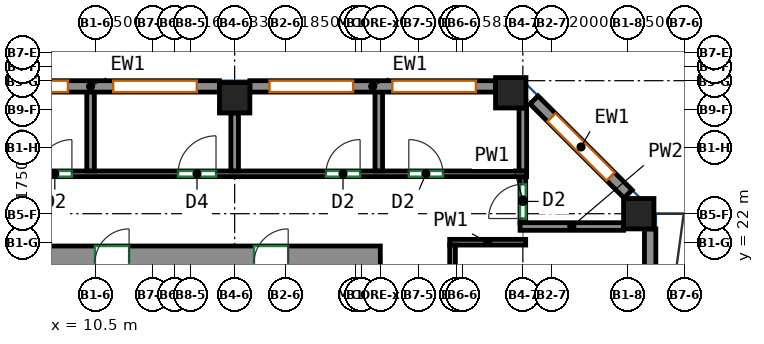
"""IFC4 building model, lengths in metres.
Left out: names, types, materials, properties, quantities, classifications, styles, units other than length and angle.
Written with IfcOpenShell. Run it as: python <this file> out.ifc"""

import sys

from ifc_helpers import new_model, si_unit, direction, frame, frame_2d, origin, origin_2d, place, context, subcontext, project, spatial, rectangle, extrude, source, transform, mapped, element, fill, save


model = new_model("IFC4")
c1 = context("Model", 3, precision=1e-05, world=origin(), true_north=direction((0.0, 1.0)))
c2 = subcontext(c1, "Body", "Model", "MODEL_VIEW")
j1 = project(units=[si_unit("LENGTHUNIT", "METRE"), si_unit("PLANEANGLEUNIT", "RADIAN")], contexts=[c1])
p1 = place(None, origin())
s1 = spatial("IfcSite", under=j1, at=p1, CompositionType="ELEMENT")
p2 = place(p1, origin())
s2 = spatial("IfcBuilding", under=s1, at=p2, CompositionType="ELEMENT")
p3 = place(p2, frame((0.0, 0.0, 175.3)))
s3 = spatial("IfcBuildingStorey", under=s2, at=p3, CompositionType="ELEMENT", Elevation=175.3)
m1 = source(origin(), c2, "Body", "SweptSolid", [
    extrude(rectangle(XDim=0.8, YDim=0.8, at=origin_2d()), origin(), (0.0, 0.0, 1.0), 3.12),
])
for number, where, z_axis, x_axis in (
    (1, (14.167, 25.8, 0.0), (0.0, 0.0, 1.0), (1.0, 0.0, 0.0)),
    (2, (21.432, 25.932, 0.0), (0.0, 0.0, 1.0), (1.0, 0.0, 0.0)),
    (3, (24.8, 22.75, 0.0), (0.0, 0.0, 1.0), (1.0, 0.0, 0.0)),
):
    element("IfcColumn", number, at=place(p3, frame(where, z_axis=z_axis, x_axis=x_axis)), inside=s3, PredefinedType="COLUMN", context=c2, shape_type="MappedRepresentation", body=[
        mapped(m1, transform((0.0, 0.0, 0.0))),
    ])
m2 = source(origin(), c2, "Body", "SweptSolid", [
    extrude(rectangle(XDim=33.9, YDim=0.9, at=frame_2d((16.95, 0.0))), origin(), (0.0, 0.0, 1.0), 3.12),
])
p4 = place(p3, frame((-15.9, 21.45, 0.0), z_axis=(0.0, 0.0, 1.0), x_axis=(1.0, 0.0, 0.0)))
e4 = element("IfcWall", 4, at=p4, inside=s3, PredefinedType="SHEAR", context=c2, shape_type="MappedRepresentation", body=[
    mapped(m2, transform((0.0, 0.0, 0.0))),
])
p5 = place(p4, frame((6.008, 0.0, 0.0)))
e5 = element("IfcOpeningElement", 5, at=p5, cuts=e4, PredefinedType="OPENING", context=c2, shape_type="SweptSolid", body=[
    extrude(rectangle(XDim=0.9, YDim=2.1, at=frame_2d((0.45, 1.05))), frame((0.0, 0.46, 0.0), z_axis=(0.0, -1.0, 0.0), x_axis=(1.0, 0.0, 0.0)), (0.0, 0.0, 1.0), 0.92),
])
p6 = place(p4, frame((11.073, 0.0, 0.0)))
e6 = element("IfcOpeningElement", 6, at=p6, cuts=e4, PredefinedType="OPENING", context=c2, shape_type="SweptSolid", body=[
    extrude(rectangle(XDim=0.9, YDim=2.1, at=frame_2d((0.45, 1.05))), frame((0.0, 0.46, 0.0), z_axis=(0.0, -1.0, 0.0), x_axis=(1.0, 0.0, 0.0)), (0.0, 0.0, 1.0), 0.92),
])
p7 = place(p4, frame((16.205, 0.0, 0.0)))
e7 = element("IfcOpeningElement", 7, at=p7, cuts=e4, PredefinedType="OPENING", context=c2, shape_type="SweptSolid", body=[
    extrude(rectangle(XDim=0.9, YDim=2.1, at=frame_2d((0.45, 1.05))), frame((0.0, 0.46, 0.0), z_axis=(0.0, -1.0, 0.0), x_axis=(1.0, 0.0, 0.0)), (0.0, 0.0, 1.0), 0.92),
])
p8 = place(p4, frame((21.029, 0.0, 0.0)))
e8 = element("IfcOpeningElement", 8, at=p8, cuts=e4, PredefinedType="OPENING", context=c2, shape_type="SweptSolid", body=[
    extrude(rectangle(XDim=0.9, YDim=2.1, at=frame_2d((0.45, 1.05))), frame((0.0, 0.46, 0.0), z_axis=(0.0, -1.0, 0.0), x_axis=(1.0, 0.0, 0.0)), (0.0, 0.0, 1.0), 0.92),
])
p9 = place(p4, frame((26.389, 0.0, 0.0)))
e9 = element("IfcOpeningElement", 9, at=p9, cuts=e4, PredefinedType="OPENING", context=c2, shape_type="SweptSolid", body=[
    extrude(rectangle(XDim=0.9, YDim=2.1, at=frame_2d((0.45, 1.05))), frame((0.0, 0.46, 0.0), z_axis=(0.0, -1.0, 0.0), x_axis=(1.0, 0.0, 0.0)), (0.0, 0.0, 1.0), 0.92),
])
p10 = place(p4, frame((2.425, 0.0, 0.0)))
e10 = element("IfcOpeningElement", 10, at=p10, cuts=e4, PredefinedType="OPENING", context=c2, shape_type="SweptSolid", body=[
    extrude(rectangle(XDim=0.9, YDim=2.1, at=frame_2d((0.45, 1.05))), frame((0.0, 0.46, 0.0), z_axis=(0.0, -1.0, 0.0), x_axis=(1.0, 0.0, 0.0)), (0.0, 0.0, 1.0), 0.92),
])
p11 = place(p4, frame((30.575, 0.0, 0.0)))
e11 = element("IfcOpeningElement", 11, at=p11, cuts=e4, PredefinedType="OPENING", context=c2, shape_type="SweptSolid", body=[
    extrude(rectangle(XDim=0.9, YDim=2.1, at=frame_2d((0.45, 1.05))), frame((0.0, 0.46, 0.0), z_axis=(0.0, -1.0, 0.0), x_axis=(1.0, 0.0, 0.0)), (0.0, 0.0, 1.0), 0.92),
])
m3 = source(origin(), c2, "Body", "SweptSolid", [
    extrude(rectangle(XDim=13.95, YDim=0.3, at=frame_2d((6.975, 0.0))), origin(), (0.0, 0.0, 1.0), 3.12),
])
p12 = place(p3, frame((25.1, 8.4, 0.0), z_axis=(0.0, 0.0, 1.0), x_axis=(0.0, 1.0, 0.0)))
e12 = element("IfcWall", 12, at=p12, inside=s3, PredefinedType="SOLIDWALL", context=c2, shape_type="MappedRepresentation", body=[
    mapped(m3, transform((0.0, 0.0, 0.0))),
])
p13 = place(p12, frame((0.994, 0.0, 0.85)))
e13 = element("IfcOpeningElement", 13, at=p13, cuts=e12, PredefinedType="OPENING", context=c2, shape_type="SweptSolid", body=[
    extrude(rectangle(XDim=1.5, YDim=1.95, at=frame_2d((0.75, 0.975))), frame((0.0, 0.16, 0.0), z_axis=(0.0, -1.0, 0.0), x_axis=(1.0, 0.0, 0.0)), (0.0, 0.0, 1.0), 0.32),
])
p14 = place(p12, frame((4.481, 0.0, 0.85)))
e14 = element("IfcOpeningElement", 14, at=p14, cuts=e12, PredefinedType="OPENING", context=c2, shape_type="SweptSolid", body=[
    extrude(rectangle(XDim=1.5, YDim=1.95, at=frame_2d((0.75, 0.975))), frame((0.0, 0.16, 0.0), z_axis=(0.0, -1.0, 0.0), x_axis=(1.0, 0.0, 0.0)), (0.0, 0.0, 1.0), 0.32),
])
p15 = place(p12, frame((7.969, 0.0, 0.85)))
e15 = element("IfcOpeningElement", 15, at=p15, cuts=e12, PredefinedType="OPENING", context=c2, shape_type="SweptSolid", body=[
    extrude(rectangle(XDim=1.5, YDim=1.95, at=frame_2d((0.75, 0.975))), frame((0.0, 0.16, 0.0), z_axis=(0.0, -1.0, 0.0), x_axis=(1.0, 0.0, 0.0)), (0.0, 0.0, 1.0), 0.32),
])
p16 = place(p12, frame((11.456, 0.0, 0.85)))
e16 = element("IfcOpeningElement", 16, at=p16, cuts=e12, PredefinedType="OPENING", context=c2, shape_type="SweptSolid", body=[
    extrude(rectangle(XDim=1.5, YDim=1.95, at=frame_2d((0.75, 0.975))), frame((0.0, 0.16, 0.0), z_axis=(0.0, -1.0, 0.0), x_axis=(1.0, 0.0, 0.0)), (0.0, 0.0, 1.0), 0.32),
])
m4 = source(origin(), c2, "Body", "SweptSolid", [
    extrude(rectangle(XDim=3.5, YDim=0.3, at=frame_2d((1.75, 0.0))), origin(), (0.0, 0.0, 1.0), 3.12),
])
p17 = place(p3, frame((24.519, 23.269, 0.0), z_axis=(0.0, 0.0, 1.0), x_axis=(-0.70707190453, 0.707141656123, 0.0)))
e17 = element("IfcWall", 17, at=p17, inside=s3, PredefinedType="SOLIDWALL", context=c2, shape_type="MappedRepresentation", body=[
    mapped(m4, transform((0.0, 0.0, 0.0))),
])
p18 = place(p17, frame((0.65, 0.0, 0.85)))
e18 = element("IfcOpeningElement", 18, at=p18, cuts=e17, PredefinedType="OPENING", context=c2, shape_type="SweptSolid", body=[
    extrude(rectangle(XDim=2.2, YDim=1.95, at=frame_2d((1.1, 0.975))), frame((0.0, 0.16, 0.0), z_axis=(0.0, -1.0, 0.0), x_axis=(1.0, 0.0, 0.0)), (0.0, 0.0, 1.0), 0.32),
])
m5 = source(origin(), c2, "Body", "SweptSolid", [
    extrude(rectangle(XDim=6.465, YDim=0.3, at=frame_2d((3.232, 0.0))), origin(), (0.0, 0.0, 1.0), 3.12),
])
p19 = place(p3, frame((21.032, 26.1, 0.0), z_axis=(0.0, 0.0, 1.0), x_axis=(-1.0, 0.0, 0.0)))
e19 = element("IfcWall", 19, at=p19, inside=s3, PredefinedType="SOLIDWALL", context=c2, shape_type="MappedRepresentation", body=[
    mapped(m5, transform((0.0, 0.0, 0.0))),
])
p20 = place(p19, frame((0.516, 0.0, 0.85)))
e20 = element("IfcOpeningElement", 20, at=p20, cuts=e19, PredefinedType="OPENING", context=c2, shape_type="SweptSolid", body=[
    extrude(rectangle(XDim=2.2, YDim=1.95, at=frame_2d((1.1, 0.975))), frame((0.0, 0.16, 0.0), z_axis=(0.0, -1.0, 0.0), x_axis=(1.0, 0.0, 0.0)), (0.0, 0.0, 1.0), 0.32),
])
p21 = place(p19, frame((3.749, 0.0, 0.85)))
e21 = element("IfcOpeningElement", 21, at=p21, cuts=e19, PredefinedType="OPENING", context=c2, shape_type="SweptSolid", body=[
    extrude(rectangle(XDim=2.2, YDim=1.95, at=frame_2d((1.1, 0.975))), frame((0.0, 0.16, 0.0), z_axis=(0.0, -1.0, 0.0), x_axis=(1.0, 0.0, 0.0)), (0.0, 0.0, 1.0), 0.32),
])
m6 = source(origin(), c2, "Body", "SweptSolid", [
    extrude(rectangle(XDim=6.783, YDim=0.3, at=frame_2d((3.392, 0.0))), origin(), (0.0, 0.0, 1.0), 3.12),
])
p22 = place(p3, frame((13.767, 26.1, 0.0), z_axis=(0.0, 0.0, 1.0), x_axis=(-1.0, 0.0, 0.0)))
e22 = element("IfcWall", 22, at=p22, inside=s3, PredefinedType="SOLIDWALL", context=c2, shape_type="MappedRepresentation", body=[
    mapped(m6, transform((0.0, 0.0, 0.0))),
])
p23 = place(p22, frame((0.596, 0.0, 0.85)))
e23 = element("IfcOpeningElement", 23, at=p23, cuts=e22, PredefinedType="OPENING", context=c2, shape_type="SweptSolid", body=[
    extrude(rectangle(XDim=2.2, YDim=1.95, at=frame_2d((1.1, 0.975))), frame((0.0, 0.16, 0.0), z_axis=(0.0, -1.0, 0.0), x_axis=(1.0, 0.0, 0.0)), (0.0, 0.0, 1.0), 0.32),
])
p24 = place(p22, frame((3.988, 0.0, 0.85)))
e24 = element("IfcOpeningElement", 24, at=p24, cuts=e22, PredefinedType="OPENING", context=c2, shape_type="SweptSolid", body=[
    extrude(rectangle(XDim=2.2, YDim=1.95, at=frame_2d((1.1, 0.975))), frame((0.0, 0.16, 0.0), z_axis=(0.0, -1.0, 0.0), x_axis=(1.0, 0.0, 0.0)), (0.0, 0.0, 1.0), 0.32),
])
p25 = place(p3, frame((19.825, 22.0, 0.0), z_axis=(0.0, 0.0, 1.0), x_axis=(1.0, 0.0, 0.0)))
e25 = element("IfcWall", 25, at=p25, inside=s3, PredefinedType="PARTITIONING", context=c2, shape_type="SweptSolid", body=[
    extrude(rectangle(XDim=2.0, YDim=0.15, at=frame_2d((1.0, 0.0))), origin(), (0.0, 0.0, 1.0), 3.12),
])
p26 = place(p3, frame((19.9, 17.75, 0.0), z_axis=(0.0, 0.0, 1.0), x_axis=(0.0, 1.0, 0.0)))
e26 = element("IfcWall", 26, at=p26, inside=s3, PredefinedType="PARTITIONING", context=c2, shape_type="SweptSolid", body=[
    extrude(rectangle(XDim=4.175, YDim=0.15, at=frame_2d((2.087, 0.0))), origin(), (0.0, 0.0, 1.0), 3.12),
])
p27 = place(p26, frame((1.432, 0.0, 0.0)))
e27 = element("IfcOpeningElement", 27, at=p27, cuts=e26, PredefinedType="OPENING", context=c2, shape_type="SweptSolid", body=[
    extrude(rectangle(XDim=0.9, YDim=2.1, at=frame_2d((0.45, 1.05))), frame((0.0, 0.085, 0.0), z_axis=(0.0, -1.0, 0.0), x_axis=(1.0, 0.0, 0.0)), (0.0, 0.0, 1.0), 0.17),
])
p28 = place(p3, frame((21.75, 22.503, 0.0), z_axis=(0.0, 0.0, 1.0), x_axis=(0.0, 1.0, 0.0)))
e28 = element("IfcWall", 28, at=p28, inside=s3, PredefinedType="PARTITIONING", context=c2, shape_type="SweptSolid", body=[
    extrude(rectangle(XDim=1.222, YDim=0.15, at=frame_2d((0.611, 0.0))), origin(), (0.0, 0.0, 1.0), 3.12),
])
p29 = place(p28, frame((0.12, 0.0, 0.0)))
e29 = element("IfcOpeningElement", 29, at=p29, cuts=e28, PredefinedType="OPENING", context=c2, shape_type="SweptSolid", body=[
    extrude(rectangle(XDim=0.9, YDim=2.1, at=frame_2d((0.45, 1.05))), frame((0.0, 0.085, 0.0), z_axis=(0.0, -1.0, 0.0), x_axis=(1.0, 0.0, 0.0)), (0.0, 0.0, 1.0), 0.17),
])
p30 = place(p3, frame((-20.059, 23.8, 0.0), z_axis=(0.0, 0.0, 1.0), x_axis=(1.0, 0.0, 0.0)))
e30 = element("IfcWall", 30, at=p30, inside=s3, PredefinedType="PARTITIONING", context=c2, shape_type="SweptSolid", body=[
    extrude(rectangle(XDim=41.909, YDim=0.15, at=frame_2d((20.955, 0.0))), origin(), (0.0, 0.0, 1.0), 3.12),
])
p31 = place(p30, frame((2.101, 0.0, 0.0)))
e31 = element("IfcOpeningElement", 31, at=p31, cuts=e30, PredefinedType="OPENING", context=c2, shape_type="SweptSolid", body=[
    extrude(rectangle(XDim=0.9, YDim=2.1, at=frame_2d((0.45, 1.05))), frame((0.0, 0.085, 0.0), z_axis=(0.0, -1.0, 0.0), x_axis=(1.0, 0.0, 0.0)), (0.0, 0.0, 1.0), 0.17),
])
p32 = place(p30, frame((4.585, 0.0, 0.0)))
e32 = element("IfcOpeningElement", 32, at=p32, cuts=e30, PredefinedType="OPENING", context=c2, shape_type="SweptSolid", body=[
    extrude(rectangle(XDim=1.0, YDim=2.1, at=frame_2d((0.5, 1.05))), frame((0.0, 0.085, 0.0), z_axis=(0.0, -1.0, 0.0), x_axis=(1.0, 0.0, 0.0)), (0.0, 0.0, 1.0), 0.17),
])
p33 = place(p30, frame((8.175, 0.0, 0.0)))
e33 = element("IfcOpeningElement", 33, at=p33, cuts=e30, PredefinedType="OPENING", context=c2, shape_type="SweptSolid", body=[
    extrude(rectangle(XDim=0.9, YDim=2.1, at=frame_2d((0.45, 1.05))), frame((0.0, 0.085, 0.0), z_axis=(0.0, -1.0, 0.0), x_axis=(1.0, 0.0, 0.0)), (0.0, 0.0, 1.0), 0.17),
])
p34 = place(p30, frame((13.173, 0.0, 0.0)))
e34 = element("IfcOpeningElement", 34, at=p34, cuts=e30, PredefinedType="OPENING", context=c2, shape_type="SweptSolid", body=[
    extrude(rectangle(XDim=1.0, YDim=2.1, at=frame_2d((0.5, 1.05))), frame((0.0, 0.085, 0.0), z_axis=(0.0, -1.0, 0.0), x_axis=(1.0, 0.0, 0.0)), (0.0, 0.0, 1.0), 0.17),
])
p35 = place(p30, frame((15.658, 0.0, 0.0)))
e35 = element("IfcOpeningElement", 35, at=p35, cuts=e30, PredefinedType="OPENING", context=c2, shape_type="SweptSolid", body=[
    extrude(rectangle(XDim=0.9, YDim=2.1, at=frame_2d((0.45, 1.05))), frame((0.0, 0.085, 0.0), z_axis=(0.0, -1.0, 0.0), x_axis=(1.0, 0.0, 0.0)), (0.0, 0.0, 1.0), 0.17),
])
p36 = place(p30, frame((21.315, 0.0, 0.0)))
e36 = element("IfcOpeningElement", 36, at=p36, cuts=e30, PredefinedType="OPENING", context=c2, shape_type="SweptSolid", body=[
    extrude(rectangle(XDim=0.9, YDim=2.1, at=frame_2d((0.45, 1.05))), frame((0.0, 0.085, 0.0), z_axis=(0.0, -1.0, 0.0), x_axis=(1.0, 0.0, 0.0)), (0.0, 0.0, 1.0), 0.17),
])
p37 = place(p30, frame((24.625, 0.0, 0.0)))
e37 = element("IfcOpeningElement", 37, at=p37, cuts=e30, PredefinedType="OPENING", context=c2, shape_type="SweptSolid", body=[
    extrude(rectangle(XDim=1.0, YDim=2.1, at=frame_2d((0.5, 1.05))), frame((0.0, 0.085, 0.0), z_axis=(0.0, -1.0, 0.0), x_axis=(1.0, 0.0, 0.0)), (0.0, 0.0, 1.0), 0.17),
])
p38 = place(p30, frame((29.043, 0.0, 0.0)))
e38 = element("IfcOpeningElement", 38, at=p38, cuts=e30, PredefinedType="OPENING", context=c2, shape_type="SweptSolid", body=[
    extrude(rectangle(XDim=0.9, YDim=2.1, at=frame_2d((0.45, 1.05))), frame((0.0, 0.085, 0.0), z_axis=(0.0, -1.0, 0.0), x_axis=(1.0, 0.0, 0.0)), (0.0, 0.0, 1.0), 0.17),
])
p39 = place(p30, frame((32.735, 0.0, 0.0)))
e39 = element("IfcOpeningElement", 39, at=p39, cuts=e30, PredefinedType="OPENING", context=c2, shape_type="SweptSolid", body=[
    extrude(rectangle(XDim=1.0, YDim=2.1, at=frame_2d((0.5, 1.05))), frame((0.0, 0.085, 0.0), z_axis=(0.0, -1.0, 0.0), x_axis=(1.0, 0.0, 0.0)), (0.0, 0.0, 1.0), 0.17),
])
p40 = place(p30, frame((36.627, 0.0, 0.0)))
e40 = element("IfcOpeningElement", 40, at=p40, cuts=e30, PredefinedType="OPENING", context=c2, shape_type="SweptSolid", body=[
    extrude(rectangle(XDim=0.9, YDim=2.1, at=frame_2d((0.45, 1.05))), frame((0.0, 0.085, 0.0), z_axis=(0.0, -1.0, 0.0), x_axis=(1.0, 0.0, 0.0)), (0.0, 0.0, 1.0), 0.17),
])
p41 = place(p30, frame((38.808, 0.0, 0.0)))
e41 = element("IfcOpeningElement", 41, at=p41, cuts=e30, PredefinedType="OPENING", context=c2, shape_type="SweptSolid", body=[
    extrude(rectangle(XDim=0.9, YDim=2.1, at=frame_2d((0.45, 1.05))), frame((0.0, 0.085, 0.0), z_axis=(0.0, -1.0, 0.0), x_axis=(1.0, 0.0, 0.0)), (0.0, 0.0, 1.0), 0.17),
])
p42 = place(p3, frame((24.4, 22.413, 0.0), z_axis=(0.0, 0.0, 1.0), x_axis=(-1.0, 0.0, 0.0)))
e42 = element("IfcWall", 42, at=p42, inside=s3, PredefinedType="PARTITIONING", context=c2, shape_type="SweptSolid", body=[
    extrude(rectangle(XDim=2.723, YDim=0.2, at=frame_2d((1.361, 0.0))), origin(), (0.0, 0.0, 1.0), 2.52),
])
p43 = place(p3, frame((21.75, 25.532, 0.0), z_axis=(0.0, 0.0, 1.0), x_axis=(0.0, -1.0, 0.0)))
e43 = element("IfcWall", 43, at=p43, inside=s3, PredefinedType="PARTITIONING", context=c2, shape_type="SweptSolid", body=[
    extrude(rectangle(XDim=1.655, YDim=0.2, at=frame_2d((0.828, 0.0))), origin(), (0.0, 0.0, 1.0), 3.12),
])
p44 = place(p3, frame((10.375, 23.877, 0.0), z_axis=(0.0, 0.0, 1.0), x_axis=(0.0, 1.0, 0.0)))
e44 = element("IfcWall", 44, at=p44, inside=s3, PredefinedType="PARTITIONING", context=c2, shape_type="SweptSolid", body=[
    extrude(rectangle(XDim=2.123, YDim=0.2, at=frame_2d((1.062, 0.0))), origin(), (0.0, 0.0, 1.0), 3.12),
])
p45 = place(p3, frame((14.167, 23.877, 0.0), z_axis=(0.0, 0.0, 1.0), x_axis=(0.0, 1.0, 0.0)))
e45 = element("IfcWall", 45, at=p45, inside=s3, PredefinedType="PARTITIONING", context=c2, shape_type="SweptSolid", body=[
    extrude(rectangle(XDim=1.523, YDim=0.2, at=frame_2d((0.761, 0.0))), origin(), (0.0, 0.0, 1.0), 3.12),
])
p46 = place(p3, frame((17.959, 23.877, 0.0), z_axis=(0.0, 0.0, 1.0), x_axis=(0.0, 1.0, 0.0)))
e46 = element("IfcWall", 46, at=p46, inside=s3, PredefinedType="PARTITIONING", context=c2, shape_type="SweptSolid", body=[
    extrude(rectangle(XDim=2.123, YDim=0.2, at=frame_2d((1.062, 0.0))), origin(), (0.0, 0.0, 1.0), 3.12),
])
p47 = place(p18, origin())
e47 = element("IfcWindow", 47, at=p47, inside=s3, PartitioningType="SINGLE_PANEL", PredefinedType="WINDOW", context=c2, shape_type="SweptSolid", body=[
    extrude(rectangle(XDim=2.2, YDim=1.95, at=frame_2d((1.1, 0.975))), frame((0.0, 0.03, 0.0), z_axis=(0.0, -1.0, 0.0), x_axis=(1.0, 0.0, 0.0)), (0.0, 0.0, 1.0), 0.06),
])
fill(e18, e47)
p48 = place(p20, origin())
e48 = element("IfcWindow", 48, at=p48, inside=s3, PartitioningType="SINGLE_PANEL", PredefinedType="WINDOW", context=c2, shape_type="SweptSolid", body=[
    extrude(rectangle(XDim=2.2, YDim=1.95, at=frame_2d((1.1, 0.975))), frame((0.0, 0.03, 0.0), z_axis=(0.0, -1.0, 0.0), x_axis=(1.0, 0.0, 0.0)), (0.0, 0.0, 1.0), 0.06),
])
fill(e20, e48)
p49 = place(p21, origin())
e49 = element("IfcWindow", 49, at=p49, inside=s3, PartitioningType="SINGLE_PANEL", PredefinedType="WINDOW", context=c2, shape_type="SweptSolid", body=[
    extrude(rectangle(XDim=2.2, YDim=1.95, at=frame_2d((1.1, 0.975))), frame((0.0, 0.03, 0.0), z_axis=(0.0, -1.0, 0.0), x_axis=(1.0, 0.0, 0.0)), (0.0, 0.0, 1.0), 0.06),
])
fill(e21, e49)
p50 = place(p23, origin())
e50 = element("IfcWindow", 50, at=p50, inside=s3, PartitioningType="SINGLE_PANEL", PredefinedType="WINDOW", context=c2, shape_type="SweptSolid", body=[
    extrude(rectangle(XDim=2.2, YDim=1.95, at=frame_2d((1.1, 0.975))), frame((0.0, 0.03, 0.0), z_axis=(0.0, -1.0, 0.0), x_axis=(1.0, 0.0, 0.0)), (0.0, 0.0, 1.0), 0.06),
])
fill(e23, e50)
p51 = place(p24, origin())
e51 = element("IfcWindow", 51, at=p51, inside=s3, PartitioningType="SINGLE_PANEL", PredefinedType="WINDOW", context=c2, shape_type="SweptSolid", body=[
    extrude(rectangle(XDim=2.2, YDim=1.95, at=frame_2d((1.1, 0.975))), frame((0.0, 0.03, 0.0), z_axis=(0.0, -1.0, 0.0), x_axis=(1.0, 0.0, 0.0)), (0.0, 0.0, 1.0), 0.06),
])
fill(e24, e51)
p52 = place(p29, origin())
e52 = element("IfcDoor", 52, at=p52, inside=s3, OperationType="SINGLE_SWING_LEFT", PredefinedType="DOOR", context=c2, shape_type="SweptSolid", body=[
    extrude(rectangle(XDim=0.9, YDim=2.1, at=frame_2d((0.45, 1.05))), frame((0.0, 0.025, 0.0), z_axis=(0.0, -1.0, 0.0), x_axis=(1.0, 0.0, 0.0)), (0.0, 0.0, 1.0), 0.05),
])
fill(e29, e52)
p53 = place(p38, origin())
e53 = element("IfcDoor", 53, at=p53, inside=s3, OperationType="SINGLE_SWING_RIGHT", PredefinedType="DOOR", context=c2, shape_type="SweptSolid", body=[
    extrude(rectangle(XDim=0.9, YDim=2.1, at=frame_2d((0.45, 1.05))), frame((0.0, 0.025, 0.0), z_axis=(0.0, -1.0, 0.0), x_axis=(1.0, 0.0, 0.0)), (0.0, 0.0, 1.0), 0.05),
])
fill(e38, e53)
p54 = place(p39, origin())
e54 = element("IfcDoor", 54, at=p54, inside=s3, OperationType="SINGLE_SWING_RIGHT", PredefinedType="DOOR", context=c2, shape_type="SweptSolid", body=[
    extrude(rectangle(XDim=1.0, YDim=2.1, at=frame_2d((0.5, 1.05))), frame((0.0, 0.025, 0.0), z_axis=(0.0, -1.0, 0.0), x_axis=(1.0, 0.0, 0.0)), (0.0, 0.0, 1.0), 0.05),
])
fill(e39, e54)
p55 = place(p40, origin())
e55 = element("IfcDoor", 55, at=p55, inside=s3, OperationType="SINGLE_SWING_RIGHT", PredefinedType="DOOR", context=c2, shape_type="SweptSolid", body=[
    extrude(rectangle(XDim=0.9, YDim=2.1, at=frame_2d((0.45, 1.05))), frame((0.0, 0.025, 0.0), z_axis=(0.0, -1.0, 0.0), x_axis=(1.0, 0.0, 0.0)), (0.0, 0.0, 1.0), 0.05),
])
fill(e40, e55)
p56 = place(p41, origin())
e56 = element("IfcDoor", 56, at=p56, inside=s3, OperationType="SINGLE_SWING_LEFT", PredefinedType="DOOR", context=c2, shape_type="SweptSolid", body=[
    extrude(rectangle(XDim=0.9, YDim=2.1, at=frame_2d((0.45, 1.05))), frame((0.0, 0.025, 0.0), z_axis=(0.0, -1.0, 0.0), x_axis=(1.0, 0.0, 0.0)), (0.0, 0.0, 1.0), 0.05),
])
fill(e41, e56)
save(model, sys.argv[1])
